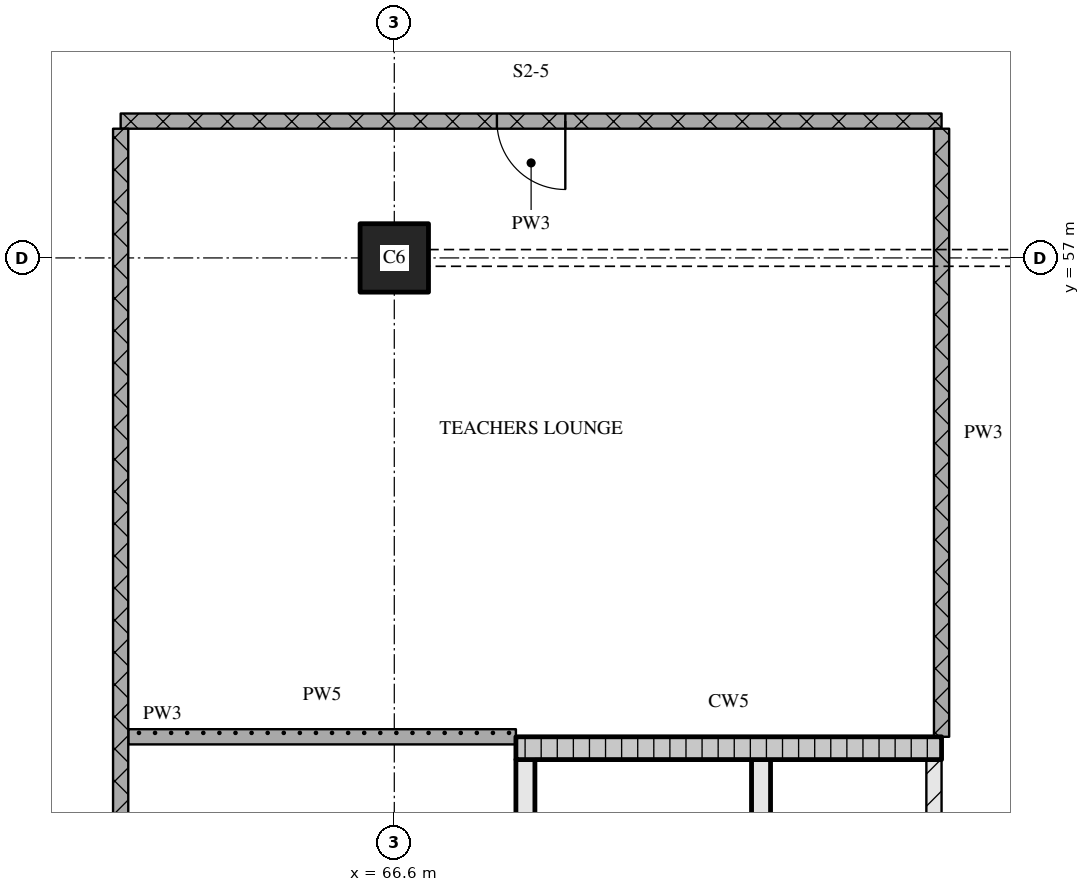
"""IFC4 building model, lengths in metres.
Left out: names, types, materials, properties, quantities, classifications, styles, units other than length and angle.
Written with IfcOpenShell. Run it as: python <this file> out.ifc"""

import sys

from ifc_helpers import new_model, si_unit, direction, frame, frame_2d, origin, origin_2d, place, context, subcontext, project, spatial, rectangle, extrude, element, fill, save


model = new_model("IFC4")
c1 = context("Model", 3, precision=1e-05, world=origin(), true_north=direction((0.0, 1.0)))
c2 = subcontext(c1, "Body", "Model", "MODEL_VIEW")
j1 = project(units=[si_unit("LENGTHUNIT", "METRE"), si_unit("PLANEANGLEUNIT", "RADIAN")], contexts=[c1])
p1 = place(None, origin())
s1 = spatial("IfcSite", under=j1, at=p1, CompositionType="ELEMENT")
p2 = place(p1, origin())
s2 = spatial("IfcBuilding", under=s1, at=p2, CompositionType="ELEMENT")
p3 = place(p2, frame((0.0, 0.0, 28.2)))
s3 = spatial("IfcBuildingStorey", under=s2, at=p3, CompositionType="ELEMENT", Elevation=28.2)
p4 = place(p3, frame((66.6, 57.0, 0.0), z_axis=(0.0, 0.0, 1.0), x_axis=(1.0, 0.0, 0.0)))
e1 = element("IfcColumn", 1, at=p4, inside=s3, PredefinedType="COLUMN", context=c2, shape_type="SweptSolid", body=[
    extrude(rectangle(XDim=0.9, YDim=0.9, at=origin_2d()), origin(), (0.0, 0.0, 1.0), 4.5),
])
p5 = place(p3, frame((68.325, 43.5, 0.0), z_axis=(0.0, 0.0, 1.0), x_axis=(0.0, 1.0, 0.0)))
e2 = element("IfcWall", 2, at=p5, inside=s3, PredefinedType="SOLIDWALL", context=c2, shape_type="SweptSolid", body=[
    extrude(rectangle(XDim=6.9, YDim=0.25, at=frame_2d((3.45, 0.0))), origin(), (0.0, 0.0, 1.0), 4.2),
])
p6 = place(p3, frame((71.425, 43.5, 0.0), z_axis=(0.0, 0.0, 1.0), x_axis=(0.0, 1.0, 0.0)))
e3 = element("IfcWall", 3, at=p6, inside=s3, PredefinedType="SOLIDWALL", context=c2, shape_type="SweptSolid", body=[
    extrude(rectangle(XDim=6.9, YDim=0.25, at=frame_2d((3.45, 0.0))), origin(), (0.0, 0.0, 1.0), 4.2),
])
p7 = place(p6, frame((0.2, 0.0, 0.0)))
e4 = element("IfcOpeningElement", 4, at=p7, cuts=e3, PredefinedType="OPENING", context=c2, shape_type="SweptSolid", body=[
    extrude(rectangle(XDim=1.0, YDim=2.1, at=frame_2d((0.5, 1.05))), frame((0.0, 0.135, 0.0), z_axis=(0.0, -1.0, 0.0), x_axis=(1.0, 0.0, 0.0)), (0.0, 0.0, 1.0), 0.27),
])
p8 = place(p3, frame((73.7, 43.5, 0.0), z_axis=(0.0, 0.0, 1.0), x_axis=(0.0, 1.0, 0.0)))
e5 = element("IfcWall", 5, at=p8, inside=s3, PredefinedType="PARTITIONING", context=c2, shape_type="SweptSolid", body=[
    extrude(rectangle(XDim=6.9, YDim=0.2, at=frame_2d((3.45, 0.0))), origin(), (0.0, 0.0, 1.0), 4.2),
])
p9 = place(p8, frame((1.0, 0.0, 0.0)))
e6 = element("IfcOpeningElement", 6, at=p9, cuts=e5, PredefinedType="OPENING", context=c2, shape_type="SweptSolid", body=[
    extrude(rectangle(XDim=1.0, YDim=2.1, at=frame_2d((0.5, 1.05))), frame((0.0, 0.11, 0.0), z_axis=(0.0, -1.0, 0.0), x_axis=(1.0, 0.0, 0.0)), (0.0, 0.0, 1.0), 0.22),
])
p10 = place(p3, frame((68.2, 50.55, 0.0), z_axis=(0.0, 0.0, 1.0), x_axis=(1.0, 0.0, 0.0)))
e7 = element("IfcWall", 7, at=p10, inside=s3, PredefinedType="SOLIDWALL", context=c2, shape_type="SweptSolid", body=[
    extrude(rectangle(XDim=5.6, YDim=0.3, at=frame_2d((2.8, 0.0))), origin(), (0.0, 0.0, 1.0), 4.2),
])
p11 = place(p3, frame((63.1, 50.7, 0.0), z_axis=(0.0, 0.0, 1.0), x_axis=(1.0, 0.0, 0.0)))
e8 = element("IfcWall", 8, at=p11, inside=s3, PredefinedType="PARTITIONING", context=c2, shape_type="SweptSolid", body=[
    extrude(rectangle(XDim=5.1, YDim=0.2, at=frame_2d((2.55, 0.0))), origin(), (0.0, 0.0, 1.0), 4.2),
])
p12 = place(p3, frame((73.8, 58.8, 0.0), z_axis=(0.0, 0.0, 1.0), x_axis=(-1.0, 0.0, 0.0)))
e9 = element("IfcWall", 9, at=p12, inside=s3, PredefinedType="PARTITIONING", context=c2, shape_type="SweptSolid", body=[
    extrude(rectangle(XDim=10.8, YDim=0.2, at=frame_2d((5.4, 0.0))), origin(), (0.0, 0.0, 1.0), 4.2),
])
p13 = place(p12, frame((4.95, 0.0, 0.0)))
e10 = element("IfcOpeningElement", 10, at=p13, cuts=e9, PredefinedType="OPENING", context=c2, shape_type="SweptSolid", body=[
    extrude(rectangle(XDim=0.9, YDim=2.1, at=frame_2d((0.45, 1.05))), frame((0.0, 0.11, 0.0), z_axis=(0.0, -1.0, 0.0), x_axis=(1.0, 0.0, 0.0)), (0.0, 0.0, 1.0), 0.22),
])
p14 = place(p3, frame((63.0, 58.7, 0.0), z_axis=(0.0, 0.0, 1.0), x_axis=(0.0, -1.0, 0.0)))
e11 = element("IfcWall", 11, at=p14, inside=s3, PredefinedType="PARTITIONING", context=c2, shape_type="SweptSolid", body=[
    extrude(rectangle(XDim=15.4, YDim=0.2, at=frame_2d((7.7, 0.0))), origin(), (0.0, 0.0, 1.0), 4.2),
])
p15 = place(p14, frame((11.25, 0.0, 0.0)))
e12 = element("IfcOpeningElement", 12, at=p15, cuts=e11, PredefinedType="OPENING", context=c2, shape_type="SweptSolid", body=[
    extrude(rectangle(XDim=0.9, YDim=2.1, at=frame_2d((0.45, 1.05))), frame((0.0, 0.11, 0.0), z_axis=(0.0, -1.0, 0.0), x_axis=(1.0, 0.0, 0.0)), (0.0, 0.0, 1.0), 0.22),
])
p16 = place(p3, frame((73.8, 58.7, 0.0), z_axis=(0.0, 0.0, 1.0), x_axis=(0.0, -1.0, 0.0)))
e13 = element("IfcWall", 13, at=p16, inside=s3, PredefinedType="PARTITIONING", context=c2, shape_type="SweptSolid", body=[
    extrude(rectangle(XDim=8.0, YDim=0.2, at=frame_2d((4.0, 0.0))), origin(), (0.0, 0.0, 1.0), 4.2),
])
p17 = place(p13, origin())
e14 = element("IfcDoor", 14, at=p17, inside=s3, OperationType="SINGLE_SWING_LEFT", PredefinedType="DOOR", context=c2, shape_type="SweptSolid", body=[
    extrude(rectangle(XDim=0.9, YDim=2.1, at=frame_2d((0.45, 1.05))), frame((0.0, 0.025, 0.0), z_axis=(0.0, -1.0, 0.0), x_axis=(1.0, 0.0, 0.0)), (0.0, 0.0, 1.0), 0.05),
])
fill(e10, e14)
save(model, sys.argv[1])
